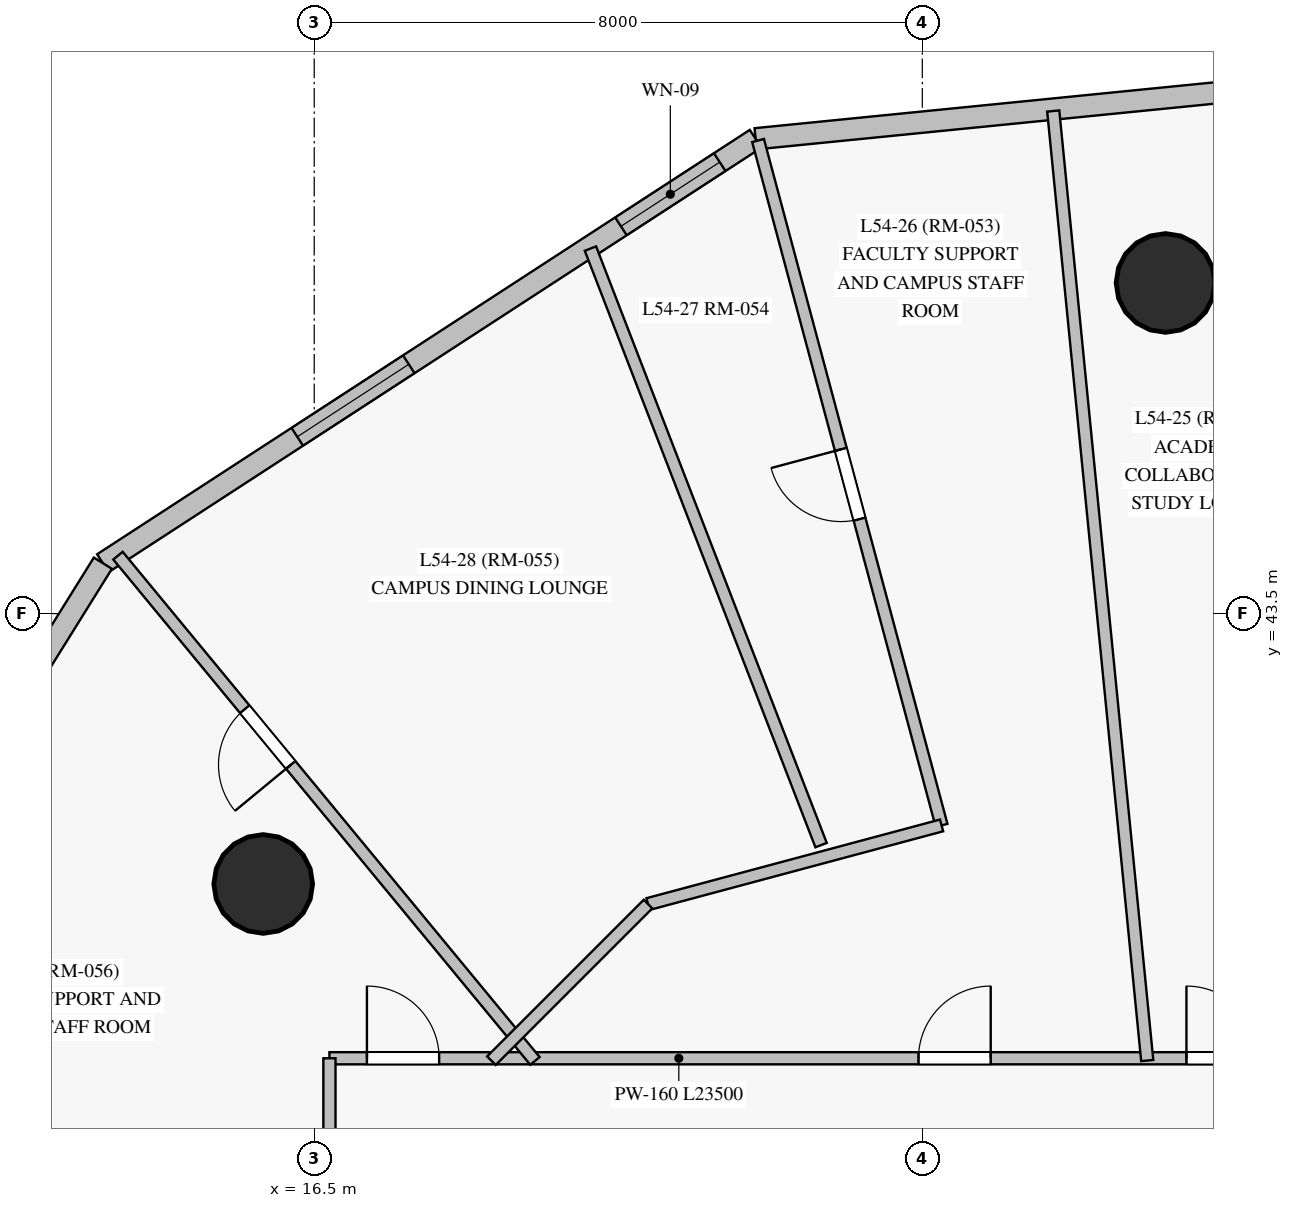
"""IFC4 building model, lengths in metres.
Left out: names, types, materials, properties, quantities, classifications, styles, units other than length and angle.
Written with IfcOpenShell. Run it as: python <this file> out.ifc"""

import sys

from ifc_helpers import new_model, si_unit, direction, frame, frame_2d, origin, origin_with_axes, origin_2d, place, context, subcontext, project, spatial, rectangle, circle, extrude, source, transform, mapped, element, fill, save


model = new_model("IFC4")
c1 = context("Model", 3, precision=1e-05, world=origin(), true_north=direction((0.0, 1.0)))
c2 = subcontext(c1, "Body", "Model", "MODEL_VIEW")
j1 = project(units=[si_unit("LENGTHUNIT", "METRE"), si_unit("PLANEANGLEUNIT", "RADIAN")], contexts=[c1])
p1 = place(None, origin())
s1 = spatial("IfcSite", under=j1, at=p1, CompositionType="ELEMENT")
p2 = place(p1, origin())
s2 = spatial("IfcBuilding", under=s1, at=p2, CompositionType="ELEMENT")
p3 = place(p2, frame((0.0, 0.0, 187.05)))
s3 = spatial("IfcBuildingStorey", under=s2, at=p3, CompositionType="ELEMENT", Elevation=187.05)
m1 = source(origin_with_axes(), c2, "Body", "SweptSolid", [
    extrude(circle(Radius=0.65, at=origin_2d()), origin(), (0.0, 0.0, 1.0), 3.05),
])
for number, where, z_axis, x_axis in (
    (1, (27.7, 47.85, 0.0), (0.0, 0.0, 1.0), (1.0, 0.0, 0.0)),
    (2, (15.829, 39.943, 0.0), (0.0, 0.0, 1.0), (1.0, 0.0, 0.0)),
):
    element("IfcColumn", number, at=place(p3, frame(where, z_axis=z_axis, x_axis=x_axis)), inside=s3, PredefinedType="COLUMN", context=c2, shape_type="MappedRepresentation", body=[
        mapped(m1, transform((0.0, 0.0, 0.0), scale=1.0)),
    ])
p4 = place(p3, frame((35.374, 51.05, 0.0), z_axis=(0.0, 0.0, 1.0), x_axis=(-0.995061275338, -0.099262572617, 0.0)))
e3 = element("IfcWall", 3, at=p4, inside=s3, PredefinedType="SOLIDWALL", context=c2, shape_type="SweptSolid", body=[
    extrude(rectangle(XDim=13.132, YDim=0.28, at=frame_2d((6.566, 0.0))), origin(), (0.0, 0.0, 1.0), 2.495),
])
p5 = place(p3, frame((22.307, 49.747, 0.0), z_axis=(0.0, 0.0, 1.0), x_axis=(-0.838379351777, -0.545087206339, 0.0)))
e4 = element("IfcWall", 4, at=p5, inside=s3, PredefinedType="SOLIDWALL", context=c2, shape_type="SweptSolid", body=[
    extrude(rectangle(XDim=10.243, YDim=0.28, at=frame_2d((5.122, 0.0))), origin(), (0.0, 0.0, 1.0), 2.825),
])
p6 = place(p5, frame((0.563, 0.0, 0.85)))
e5 = element("IfcOpeningElement", 5, at=p6, cuts=e4, PredefinedType="OPENING", context=c2, shape_type="SweptSolid", body=[
    extrude(rectangle(XDim=1.55, YDim=1.65, at=frame_2d((0.775, 0.825))), frame((0.0, 0.15, 0.0), z_axis=(0.0, -1.0, 0.0), x_axis=(1.0, 0.0, 0.0)), (0.0, 0.0, 1.0), 0.3),
])
p7 = place(p5, frame((5.442, 0.0, 0.85)))
e6 = element("IfcOpeningElement", 6, at=p7, cuts=e4, PredefinedType="OPENING", context=c2, shape_type="SweptSolid", body=[
    extrude(rectangle(XDim=1.75, YDim=1.65, at=frame_2d((0.875, 0.825))), frame((0.0, 0.15, 0.0), z_axis=(0.0, -1.0, 0.0), x_axis=(1.0, 0.0, 0.0)), (0.0, 0.0, 1.0), 0.3),
])
p8 = place(p3, frame((13.719, 44.163, 0.0), z_axis=(0.0, 0.0, 1.0), x_axis=(-0.52888179639, -0.848695496304, 0.0)))
e7 = element("IfcWall", 7, at=p8, inside=s3, PredefinedType="SOLIDWALL", context=c2, shape_type="SweptSolid", body=[
    extrude(rectangle(XDim=14.248, YDim=0.28, at=frame_2d((7.124, 0.0))), origin(), (0.0, 0.0, 1.0), 2.825),
])
p9 = place(p8, frame((1.703, 0.0, 0.85)))
e8 = element("IfcOpeningElement", 8, at=p9, cuts=e7, PredefinedType="OPENING", context=c2, shape_type="SweptSolid", body=[
    extrude(rectangle(XDim=1.75, YDim=1.65, at=frame_2d((0.875, 0.825))), frame((0.0, 0.15, 0.0), z_axis=(0.0, -1.0, 0.0), x_axis=(1.0, 0.0, 0.0)), (0.0, 0.0, 1.0), 0.3),
])
p10 = place(p8, frame((6.099, 0.0, 0.85)))
e9 = element("IfcOpeningElement", 9, at=p10, cuts=e7, PredefinedType="OPENING", context=c2, shape_type="SweptSolid", body=[
    extrude(rectangle(XDim=1.75, YDim=1.65, at=frame_2d((0.875, 0.825))), frame((0.0, 0.15, 0.0), z_axis=(0.0, -1.0, 0.0), x_axis=(1.0, 0.0, 0.0)), (0.0, 0.0, 1.0), 0.3),
])
p11 = place(p8, frame((10.021, 0.0, 0.85)))
e10 = element("IfcOpeningElement", 10, at=p11, cuts=e7, PredefinedType="OPENING", context=c2, shape_type="SweptSolid", body=[
    extrude(rectangle(XDim=1.75, YDim=1.65, at=frame_2d((0.875, 0.825))), frame((0.0, 0.15, 0.0), z_axis=(0.0, -1.0, 0.0), x_axis=(1.0, 0.0, 0.0)), (0.0, 0.0, 1.0), 0.3),
])
p12 = place(p8, frame((12.769, 0.0, 0.85)))
e11 = element("IfcOpeningElement", 11, at=p12, cuts=e7, PredefinedType="OPENING", context=c2, shape_type="SweptSolid", body=[
    extrude(rectangle(XDim=0.95, YDim=1.5, at=frame_2d((0.475, 0.75))), frame((0.0, 0.15, 0.0), z_axis=(0.0, -1.0, 0.0), x_axis=(1.0, 0.0, 0.0)), (0.0, 0.0, 1.0), 0.3),
])
p13 = place(p3, frame((16.7, 37.65, 0.0), z_axis=(0.0, 0.0, 1.0), x_axis=(1.0, 0.0, 0.0)))
e12 = element("IfcWall", 12, at=p13, inside=s3, PredefinedType="PARTITIONING", context=c2, shape_type="SweptSolid", body=[
    extrude(rectangle(XDim=23.5, YDim=0.16, at=frame_2d((11.75, 0.0))), origin(), (0.0, 0.0, 1.0), 2.375),
])
p14 = place(p13, frame((21.043, 0.0, 0.0)))
e13 = element("IfcOpeningElement", 13, at=p14, cuts=e12, PredefinedType="OPENING", context=c2, shape_type="SweptSolid", body=[
    extrude(rectangle(XDim=0.95, YDim=2.15, at=frame_2d((0.475, 1.075))), frame((0.0, 0.09, 0.0), z_axis=(0.0, -1.0, 0.0), x_axis=(1.0, 0.0, 0.0)), (0.0, 0.0, 1.0), 0.18),
])
p15 = place(p13, frame((17.79, 0.0, 0.0)))
e14 = element("IfcOpeningElement", 14, at=p15, cuts=e12, PredefinedType="OPENING", context=c2, shape_type="SweptSolid", body=[
    extrude(rectangle(XDim=0.95, YDim=2.15, at=frame_2d((0.475, 1.075))), frame((0.0, 0.09, 0.0), z_axis=(0.0, -1.0, 0.0), x_axis=(1.0, 0.0, 0.0)), (0.0, 0.0, 1.0), 0.18),
])
p16 = place(p13, frame((15.763, 0.0, 0.0)))
e15 = element("IfcOpeningElement", 15, at=p16, cuts=e12, PredefinedType="OPENING", context=c2, shape_type="SweptSolid", body=[
    extrude(rectangle(XDim=0.95, YDim=2.15, at=frame_2d((0.475, 1.075))), frame((0.0, 0.09, 0.0), z_axis=(0.0, -1.0, 0.0), x_axis=(1.0, 0.0, 0.0)), (0.0, 0.0, 1.0), 0.18),
])
p17 = place(p13, frame((13.003, 0.0, 0.0)))
e16 = element("IfcOpeningElement", 16, at=p17, cuts=e12, PredefinedType="OPENING", context=c2, shape_type="SweptSolid", body=[
    extrude(rectangle(XDim=0.95, YDim=2.15, at=frame_2d((0.475, 1.075))), frame((0.0, 0.09, 0.0), z_axis=(0.0, -1.0, 0.0), x_axis=(1.0, 0.0, 0.0)), (0.0, 0.0, 1.0), 0.18),
])
p18 = place(p13, frame((11.275, 0.0, 0.0)))
e17 = element("IfcOpeningElement", 17, at=p18, cuts=e12, PredefinedType="OPENING", context=c2, shape_type="SweptSolid", body=[
    extrude(rectangle(XDim=0.95, YDim=2.15, at=frame_2d((0.475, 1.075))), frame((0.0, 0.09, 0.0), z_axis=(0.0, -1.0, 0.0), x_axis=(1.0, 0.0, 0.0)), (0.0, 0.0, 1.0), 0.18),
])
p19 = place(p13, frame((7.75, 0.0, 0.0)))
e18 = element("IfcOpeningElement", 18, at=p19, cuts=e12, PredefinedType="OPENING", context=c2, shape_type="SweptSolid", body=[
    extrude(rectangle(XDim=0.95, YDim=2.15, at=frame_2d((0.475, 1.075))), frame((0.0, 0.09, 0.0), z_axis=(0.0, -1.0, 0.0), x_axis=(1.0, 0.0, 0.0)), (0.0, 0.0, 1.0), 0.18),
])
p20 = place(p13, frame((0.493, 0.0, 0.0)))
e19 = element("IfcOpeningElement", 19, at=p20, cuts=e12, PredefinedType="OPENING", context=c2, shape_type="SweptSolid", body=[
    extrude(rectangle(XDim=0.95, YDim=2.15, at=frame_2d((0.475, 1.075))), frame((0.0, 0.09, 0.0), z_axis=(0.0, -1.0, 0.0), x_axis=(1.0, 0.0, 0.0)), (0.0, 0.0, 1.0), 0.18),
])
p21 = place(p3, frame((16.7, 15.35, 0.0), z_axis=(0.0, 0.0, 1.0), x_axis=(0.0, 1.0, 0.0)))
e20 = element("IfcWall", 20, at=p21, inside=s3, PredefinedType="PARTITIONING", context=c2, shape_type="SweptSolid", body=[
    extrude(rectangle(XDim=22.3, YDim=0.16, at=frame_2d((11.15, 0.0))), origin(), (0.0, 0.0, 1.0), 2.275),
])
p22 = place(p21, frame((10.435, 0.0, 0.0)))
e21 = element("IfcOpeningElement", 21, at=p22, cuts=e20, PredefinedType="OPENING", context=c2, shape_type="SweptSolid", body=[
    extrude(rectangle(XDim=0.96, YDim=2.15, at=frame_2d((0.48, 1.075))), frame((0.0, 0.09, 0.0), z_axis=(0.0, -1.0, 0.0), x_axis=(1.0, 0.0, 0.0)), (0.0, 0.0, 1.0), 0.18),
])
p23 = place(p21, frame((2.469, 0.0, 0.0)))
e22 = element("IfcOpeningElement", 22, at=p23, cuts=e20, PredefinedType="OPENING", context=c2, shape_type="SweptSolid", body=[
    extrude(rectangle(XDim=0.95, YDim=2.15, at=frame_2d((0.475, 1.075))), frame((0.0, 0.09, 0.0), z_axis=(0.0, -1.0, 0.0), x_axis=(1.0, 0.0, 0.0)), (0.0, 0.0, 1.0), 0.18),
])
p24 = place(p21, frame((16.25, 0.0, 0.0)))
e23 = element("IfcOpeningElement", 23, at=p24, cuts=e20, PredefinedType="OPENING", context=c2, shape_type="SweptSolid", body=[
    extrude(rectangle(XDim=0.95, YDim=2.15, at=frame_2d((0.475, 1.075))), frame((0.0, 0.09, 0.0), z_axis=(0.0, -1.0, 0.0), x_axis=(1.0, 0.0, 0.0)), (0.0, 0.0, 1.0), 0.18),
])
p25 = place(p21, frame((13.98, 0.0, 0.0)))
e24 = element("IfcOpeningElement", 24, at=p25, cuts=e20, PredefinedType="OPENING", context=c2, shape_type="SweptSolid", body=[
    extrude(rectangle(XDim=0.95, YDim=2.15, at=frame_2d((0.475, 1.075))), frame((0.0, 0.09, 0.0), z_axis=(0.0, -1.0, 0.0), x_axis=(1.0, 0.0, 0.0)), (0.0, 0.0, 1.0), 0.18),
])
p26 = place(p3, frame((27.459, 37.62, 0.0), z_axis=(0.0, 0.0, 1.0), x_axis=(-0.098527382243, 0.995134340151, 0.0)))
e25 = element("IfcWall", 25, at=p26, inside=s3, PredefinedType="PARTITIONING", context=c2, shape_type="SweptSolid", body=[
    extrude(rectangle(XDim=12.553, YDim=0.16, at=frame_2d((6.276, 0.0))), origin(), (0.0, 0.0, 1.0), 2.275),
])
p27 = place(p3, frame((24.754, 40.713, 0.0), z_axis=(0.0, 0.0, 1.0), x_axis=(-0.258838559271, 0.965920597272, 0.0)))
e26 = element("IfcWall", 26, at=p27, inside=s3, PredefinedType="PARTITIONING", context=c2, shape_type="SweptSolid", body=[
    extrude(rectangle(XDim=9.328, YDim=0.16, at=frame_2d((4.664, 0.0))), origin(), (0.0, 0.0, 1.0), 2.825),
])
p28 = place(p27, frame((4.172, 0.0, 0.0)))
e27 = element("IfcOpeningElement", 27, at=p28, cuts=e26, PredefinedType="OPENING", context=c2, shape_type="SweptSolid", body=[
    extrude(rectangle(XDim=0.95, YDim=2.15, at=frame_2d((0.475, 1.075))), frame((0.0, 0.09, 0.0), z_axis=(0.0, -1.0, 0.0), x_axis=(1.0, 0.0, 0.0)), (0.0, 0.0, 1.0), 0.18),
])
p29 = place(p3, frame((19.404, 37.615, 0.0), z_axis=(0.0, 0.0, 1.0), x_axis=(-0.636513152023, 0.771265847358, 0.0)))
e28 = element("IfcWall", 28, at=p29, inside=s3, PredefinedType="PARTITIONING", context=c2, shape_type="SweptSolid", body=[
    extrude(rectangle(XDim=8.619, YDim=0.16, at=frame_2d((4.309, 0.0))), origin(), (0.0, 0.0, 1.0), 2.825),
])
p30 = place(p29, frame((5.049, 0.0, 0.0)))
e29 = element("IfcOpeningElement", 29, at=p30, cuts=e28, PredefinedType="OPENING", context=c2, shape_type="SweptSolid", body=[
    extrude(rectangle(XDim=0.95, YDim=2.15, at=frame_2d((0.475, 1.075))), frame((0.0, 0.09, 0.0), z_axis=(0.0, -1.0, 0.0), x_axis=(1.0, 0.0, 0.0)), (0.0, 0.0, 1.0), 0.18),
])
p31 = place(p3, frame((23.168, 40.454, 0.0), z_axis=(0.0, 0.0, 1.0), x_axis=(-0.360660337698, 0.932697228907, 0.0)))
e30 = element("IfcWall", 30, at=p31, inside=s3, PredefinedType="PARTITIONING", context=c2, shape_type="SweptSolid", body=[
    extrude(rectangle(XDim=8.414, YDim=0.16, at=frame_2d((4.207, 0.0))), origin(), (0.0, 0.0, 1.0), 2.825),
])
p32 = place(p3, frame((20.891, 39.678, 0.0), z_axis=(0.0, 0.0, 1.0), x_axis=(0.96592515808, 0.258821538881, 0.0)))
e31 = element("IfcWall", 31, at=p32, inside=s3, PredefinedType="PARTITIONING", context=c2, shape_type="SweptSolid", body=[
    extrude(rectangle(XDim=3.999, YDim=0.16, at=frame_2d((1.999, 0.0))), origin(), (0.0, 0.0, 1.0), 2.375),
])
p33 = place(p3, frame((18.831, 37.618, 0.0), z_axis=(0.0, 0.0, 1.0), x_axis=(0.707106781187, 0.707106781187, 0.0)))
e32 = element("IfcWall", 32, at=p33, inside=s3, PredefinedType="PARTITIONING", context=c2, shape_type="SweptSolid", body=[
    extrude(rectangle(XDim=2.914, YDim=0.16, at=frame_2d((1.457, 0.0))), origin(), (0.0, 0.0, 1.0), 2.375),
])
m2 = source(origin_with_axes(), c2, "Body", "SweptSolid", [
    extrude(rectangle(XDim=1.55, YDim=1.65, at=frame_2d((0.775, 0.825))), frame((0.0, 0.03, 0.0), z_axis=(0.0, -1.0, 0.0), x_axis=(1.0, 0.0, 0.0)), (0.0, 0.0, 1.0), 0.06),
])
p34 = place(p6, origin())
e33 = element("IfcWindow", 33, at=p34, inside=s3, PartitioningType="SINGLE_PANEL", PredefinedType="WINDOW", context=c2, shape_type="MappedRepresentation", body=[
    mapped(m2, transform((0.0, 0.0, 0.0), scale=1.0)),
])
fill(e5, e33)
m3 = source(origin_with_axes(), c2, "Body", "SweptSolid", [
    extrude(rectangle(XDim=1.75, YDim=1.65, at=frame_2d((0.875, 0.825))), frame((0.0, 0.03, 0.0), z_axis=(0.0, -1.0, 0.0), x_axis=(1.0, 0.0, 0.0)), (0.0, 0.0, 1.0), 0.06),
])
p35 = place(p7, origin())
e34 = element("IfcWindow", 34, at=p35, inside=s3, PartitioningType="SINGLE_PANEL", PredefinedType="WINDOW", context=c2, shape_type="MappedRepresentation", body=[
    mapped(m3, transform((0.0, 0.0, 0.0), scale=1.0)),
])
fill(e6, e34)
m4 = source(origin_with_axes(), c2, "Body", "SweptSolid", [
    extrude(rectangle(XDim=0.95, YDim=2.15, at=frame_2d((0.475, 1.075))), frame((0.0, 0.025, 0.0), z_axis=(0.0, -1.0, 0.0), x_axis=(1.0, 0.0, 0.0)), (0.0, 0.0, 1.0), 0.05),
])
p36 = place(p18, origin())
e35 = element("IfcDoor", 35, at=p36, inside=s3, OperationType="SINGLE_SWING_LEFT", PredefinedType="DOOR", context=c2, shape_type="MappedRepresentation", body=[
    mapped(m4, transform((0.0, 0.0, 0.0), scale=1.0)),
])
fill(e17, e35)
p37 = place(p19, origin())
e36 = element("IfcDoor", 36, at=p37, inside=s3, OperationType="SINGLE_SWING_RIGHT", PredefinedType="DOOR", context=c2, shape_type="MappedRepresentation", body=[
    mapped(m4, transform((0.0, 0.0, 0.0), scale=1.0)),
])
fill(e18, e36)
p38 = place(p20, origin())
e37 = element("IfcDoor", 37, at=p38, inside=s3, OperationType="SINGLE_SWING_LEFT", PredefinedType="DOOR", context=c2, shape_type="MappedRepresentation", body=[
    mapped(m4, transform((0.0, 0.0, 0.0), scale=1.0)),
])
fill(e19, e37)
p39 = place(p28, origin())
e38 = element("IfcDoor", 38, at=p39, inside=s3, OperationType="SINGLE_SWING_RIGHT", PredefinedType="DOOR", context=c2, shape_type="MappedRepresentation", body=[
    mapped(m4, transform((0.0, 0.0, 0.0), scale=1.0)),
])
fill(e27, e38)
p40 = place(p30, origin())
e39 = element("IfcDoor", 39, at=p40, inside=s3, OperationType="SINGLE_SWING_LEFT", PredefinedType="DOOR", context=c2, shape_type="MappedRepresentation", body=[
    mapped(m4, transform((0.0, 0.0, 0.0), scale=1.0)),
])
fill(e29, e39)
save(model, sys.argv[1])
